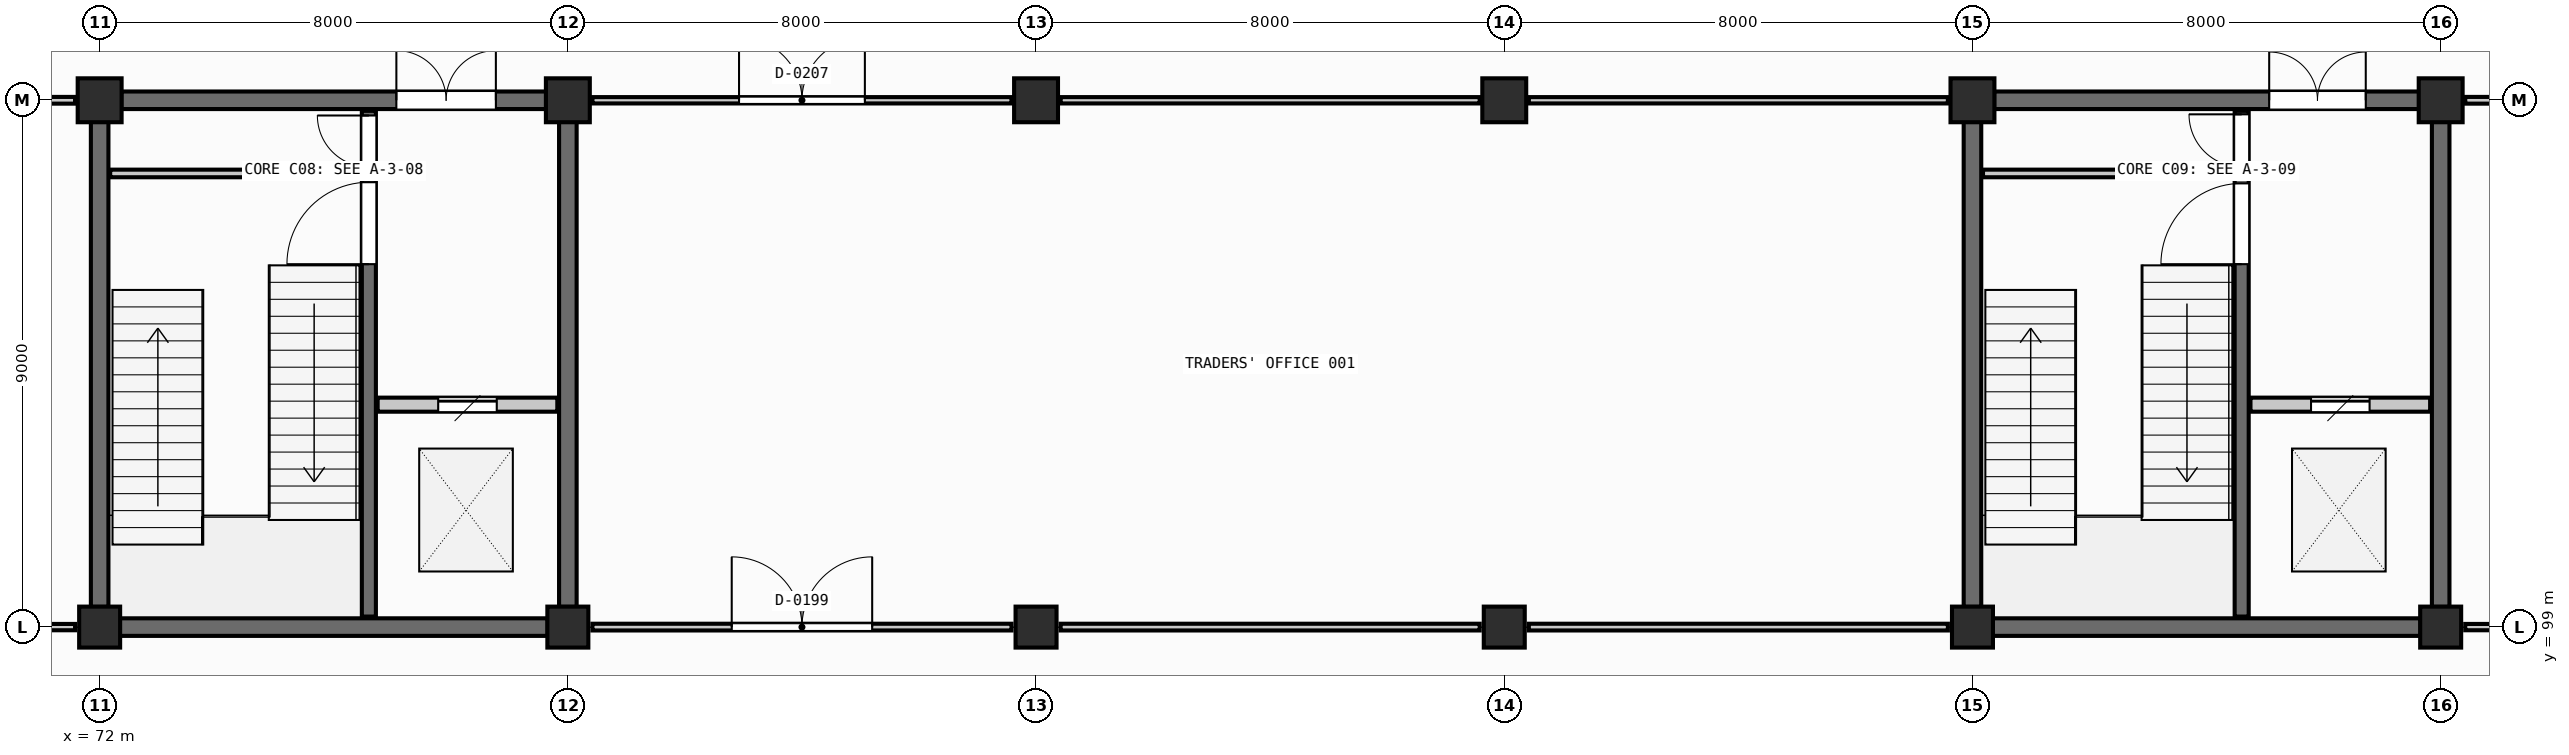
"""IFC4 building model, lengths in metres.
Left out: names, types, materials, properties, quantities, classifications, styles, units other than length and angle.
Written with IfcOpenShell. Run it as: python <this file> out.ifc"""

import sys

from ifc_helpers import new_model, si_unit, direction, frame, frame_2d, origin, origin_2d, place, context, subcontext, project, spatial, rectangle, extrude, element, fill, save


model = new_model("IFC4")
c1 = context("Model", 3, precision=1e-05, world=origin(), true_north=direction((0.0, 1.0)))
c2 = subcontext(c1, "Body", "Model", "MODEL_VIEW")
j1 = project(units=[si_unit("LENGTHUNIT", "METRE"), si_unit("PLANEANGLEUNIT", "RADIAN")], contexts=[c1])
p1 = place(None, origin())
s1 = spatial("IfcSite", under=j1, at=p1, CompositionType="ELEMENT")
p2 = place(p1, origin())
s2 = spatial("IfcBuilding", under=s1, at=p2, CompositionType="ELEMENT")
p3 = place(p2, origin())
s3 = spatial("IfcBuildingStorey", under=s2, at=p3, CompositionType="ELEMENT", Elevation=0.0)
p4 = place(p3, frame((72.0, 99.0, -1.25), z_axis=(0.0, 0.0, 1.0), x_axis=(1.0, 0.0, 0.0)))
e1 = element("IfcColumn", 1, at=p4, inside=s3, PredefinedType="COLUMN", context=c2, shape_type="SweptSolid", body=[
    extrude(rectangle(XDim=0.7, YDim=0.7, at=origin_2d()), origin(), (0.0, 0.0, 1.0), 6.05),
])
p5 = place(p3, frame((72.0, 108.0, -1.25), z_axis=(0.0, 0.0, 1.0), x_axis=(1.0, 0.0, 0.0)))
e2 = element("IfcColumn", 2, at=p5, inside=s3, PredefinedType="COLUMN", context=c2, shape_type="SweptSolid", body=[
    extrude(rectangle(XDim=0.75, YDim=0.75, at=origin_2d()), origin(), (0.0, 0.0, 1.0), 6.05),
])
p6 = place(p3, frame((80.0, 99.0, -1.25), z_axis=(0.0, 0.0, 1.0), x_axis=(1.0, 0.0, 0.0)))
e3 = element("IfcColumn", 3, at=p6, inside=s3, PredefinedType="COLUMN", context=c2, shape_type="SweptSolid", body=[
    extrude(rectangle(XDim=0.7, YDim=0.7, at=origin_2d()), origin(), (0.0, 0.0, 1.0), 6.05),
])
p7 = place(p3, frame((80.0, 108.0, -1.25), z_axis=(0.0, 0.0, 1.0), x_axis=(1.0, 0.0, 0.0)))
e4 = element("IfcColumn", 4, at=p7, inside=s3, PredefinedType="COLUMN", context=c2, shape_type="SweptSolid", body=[
    extrude(rectangle(XDim=0.75, YDim=0.75, at=origin_2d()), origin(), (0.0, 0.0, 1.0), 6.05),
])
p8 = place(p3, frame((88.0, 99.0, -1.25), z_axis=(0.0, 0.0, 1.0), x_axis=(1.0, 0.0, 0.0)))
e5 = element("IfcColumn", 5, at=p8, inside=s3, PredefinedType="COLUMN", context=c2, shape_type="SweptSolid", body=[
    extrude(rectangle(XDim=0.7, YDim=0.7, at=origin_2d()), origin(), (0.0, 0.0, 1.0), 6.05),
])
p9 = place(p3, frame((88.0, 108.0, -1.25), z_axis=(0.0, 0.0, 1.0), x_axis=(1.0, 0.0, 0.0)))
e6 = element("IfcColumn", 6, at=p9, inside=s3, PredefinedType="COLUMN", context=c2, shape_type="SweptSolid", body=[
    extrude(rectangle(XDim=0.75, YDim=0.75, at=origin_2d()), origin(), (0.0, 0.0, 1.0), 6.05),
])
p10 = place(p3, frame((96.0, 99.0, -1.25), z_axis=(0.0, 0.0, 1.0), x_axis=(1.0, 0.0, 0.0)))
e7 = element("IfcColumn", 7, at=p10, inside=s3, PredefinedType="COLUMN", context=c2, shape_type="SweptSolid", body=[
    extrude(rectangle(XDim=0.7, YDim=0.7, at=origin_2d()), origin(), (0.0, 0.0, 1.0), 6.05),
])
p11 = place(p3, frame((96.0, 108.0, -1.25), z_axis=(0.0, 0.0, 1.0), x_axis=(1.0, 0.0, 0.0)))
e8 = element("IfcColumn", 8, at=p11, inside=s3, PredefinedType="COLUMN", context=c2, shape_type="SweptSolid", body=[
    extrude(rectangle(XDim=0.75, YDim=0.75, at=origin_2d()), origin(), (0.0, 0.0, 1.0), 6.05),
])
p12 = place(p3, frame((104.0, 99.0, -1.25), z_axis=(0.0, 0.0, 1.0), x_axis=(1.0, 0.0, 0.0)))
e9 = element("IfcColumn", 9, at=p12, inside=s3, PredefinedType="COLUMN", context=c2, shape_type="SweptSolid", body=[
    extrude(rectangle(XDim=0.7, YDim=0.7, at=origin_2d()), origin(), (0.0, 0.0, 1.0), 6.05),
])
p13 = place(p3, frame((104.0, 108.0, -1.25), z_axis=(0.0, 0.0, 1.0), x_axis=(1.0, 0.0, 0.0)))
e10 = element("IfcColumn", 10, at=p13, inside=s3, PredefinedType="COLUMN", context=c2, shape_type="SweptSolid", body=[
    extrude(rectangle(XDim=0.75, YDim=0.75, at=origin_2d()), origin(), (0.0, 0.0, 1.0), 6.05),
])
p14 = place(p3, frame((112.0, 99.0, -1.25), z_axis=(0.0, 0.0, 1.0), x_axis=(1.0, 0.0, 0.0)))
e11 = element("IfcColumn", 11, at=p14, inside=s3, PredefinedType="COLUMN", context=c2, shape_type="SweptSolid", body=[
    extrude(rectangle(XDim=0.7, YDim=0.7, at=origin_2d()), origin(), (0.0, 0.0, 1.0), 6.05),
])
p15 = place(p3, frame((112.0, 108.0, -1.25), z_axis=(0.0, 0.0, 1.0), x_axis=(1.0, 0.0, 0.0)))
e12 = element("IfcColumn", 12, at=p15, inside=s3, PredefinedType="COLUMN", context=c2, shape_type="SweptSolid", body=[
    extrude(rectangle(XDim=0.75, YDim=0.75, at=origin_2d()), origin(), (0.0, 0.0, 1.0), 6.05),
])
p16 = place(p3, frame((72.345, 99.0, -1.25), z_axis=(0.0, 0.0, 1.0), x_axis=(1.0, 0.0, 0.0)))
e13 = element("IfcWall", 13, at=p16, inside=s3, PredefinedType="SHEAR", context=c2, shape_type="SweptSolid", body=[
    extrude(rectangle(XDim=7.31, YDim=0.3, at=frame_2d((3.655, 0.0))), origin(), (0.0, 0.0, 1.0), 5.805),
])
p17 = place(p3, frame((72.37, 108.0, -1.25), z_axis=(0.0, 0.0, 1.0), x_axis=(1.0, 0.0, 0.0)))
e14 = element("IfcWall", 14, at=p17, inside=s3, PredefinedType="SHEAR", context=c2, shape_type="SweptSolid", body=[
    extrude(rectangle(XDim=7.26, YDim=0.3, at=frame_2d((3.63, 0.0))), origin(), (0.0, 0.0, 1.0), 5.805),
])
p18 = place(p17, frame((4.7, 0.0, 1.25)))
e15 = element("IfcOpeningElement", 15, at=p18, cuts=e14, PredefinedType="OPENING", context=c2, shape_type="SweptSolid", body=[
    extrude(rectangle(XDim=1.7, YDim=2.25, at=frame_2d((0.85, 1.125))), frame((0.0, 0.16, 0.0), z_axis=(0.0, -1.0, 0.0), x_axis=(1.0, 0.0, 0.0)), (0.0, 0.0, 1.0), 0.32),
])
for number, where, z_axis, x_axis in (
    (16, (72.0, 99.345, -1.25), (0.0, 0.0, 1.0), (0.0, 1.0, 0.0)),
    (17, (80.0, 99.345, -1.25), (0.0, 0.0, 1.0), (0.0, 1.0, 0.0)),
):
    element("IfcWall", number, at=place(p3, frame(where, z_axis=z_axis, x_axis=x_axis)), inside=s3, PredefinedType="SHEAR", context=c2, shape_type="SweptSolid", body=[
        extrude(rectangle(XDim=8.285, YDim=0.3, at=frame_2d((4.143, 0.0))), origin(), (0.0, 0.0, 1.0), 5.805),
    ])
p19 = place(p3, frame((76.6, 99.18, -1.25), z_axis=(0.0, 0.0, 1.0), x_axis=(0.0, 1.0, 0.0)))
e18 = element("IfcWall", 18, at=p19, inside=s3, PredefinedType="SHEAR", context=c2, shape_type="SweptSolid", body=[
    extrude(rectangle(XDim=8.64, YDim=0.24, at=frame_2d((4.32, 0.0))), origin(), (0.0, 0.0, 1.0), 5.805),
])
p20 = place(p19, frame((6.02, 0.0, 1.25)))
e19 = element("IfcOpeningElement", 19, at=p20, cuts=e18, PredefinedType="OPENING", context=c2, shape_type="SweptSolid", body=[
    extrude(rectangle(XDim=1.4, YDim=2.2, at=frame_2d((0.7, 1.1))), frame((0.0, 0.13, 0.0), z_axis=(0.0, -1.0, 0.0), x_axis=(1.0, 0.0, 0.0)), (0.0, 0.0, 1.0), 0.26),
])
p21 = place(p19, frame((7.68, 0.0, 1.25)))
e20 = element("IfcOpeningElement", 20, at=p21, cuts=e18, PredefinedType="OPENING", context=c2, shape_type="SweptSolid", body=[
    extrude(rectangle(XDim=0.88, YDim=2.02, at=frame_2d((0.44, 1.01))), frame((0.0, 0.13, 0.0), z_axis=(0.0, -1.0, 0.0), x_axis=(1.0, 0.0, 0.0)), (0.0, 0.0, 1.0), 0.26),
])
p22 = place(p3, frame((72.18, 106.75, 0.0), z_axis=(0.0, 0.0, 1.0), x_axis=(1.0, 0.0, 0.0)))
e21 = element("IfcWall", 21, at=p22, inside=s3, PredefinedType="PARTITIONING", context=c2, shape_type="SweptSolid", body=[
    extrude(rectangle(XDim=4.28, YDim=0.13, at=frame_2d((2.14, 0.0))), origin(), (0.0, 0.0, 1.0), 3.905),
])
p23 = place(p3, frame((76.75, 102.8, 0.0), z_axis=(0.0, 0.0, 1.0), x_axis=(1.0, 0.0, 0.0)))
e22 = element("IfcWall", 22, at=p23, inside=s3, PredefinedType="SHEAR", context=c2, shape_type="SweptSolid", body=[
    extrude(rectangle(XDim=3.07, YDim=0.24, at=frame_2d((1.535, 0.0))), origin(), (0.0, 0.0, 1.0), 3.905),
])
p24 = place(p23, frame((1.035, 0.0, 0.0)))
e23 = element("IfcOpeningElement", 23, at=p24, cuts=e22, PredefinedType="OPENING", context=c2, shape_type="SweptSolid", body=[
    extrude(rectangle(XDim=1.0, YDim=2.15, at=frame_2d((0.5, 1.075))), frame((0.0, 0.13, 0.0), z_axis=(0.0, -1.0, 0.0), x_axis=(1.0, 0.0, 0.0)), (0.0, 0.0, 1.0), 0.26),
])
p25 = place(p3, frame((104.345, 99.0, -1.25), z_axis=(0.0, 0.0, 1.0), x_axis=(1.0, 0.0, 0.0)))
e24 = element("IfcWall", 24, at=p25, inside=s3, PredefinedType="SHEAR", context=c2, shape_type="SweptSolid", body=[
    extrude(rectangle(XDim=7.31, YDim=0.3, at=frame_2d((3.655, 0.0))), origin(), (0.0, 0.0, 1.0), 5.805),
])
p26 = place(p3, frame((104.37, 108.0, -1.25), z_axis=(0.0, 0.0, 1.0), x_axis=(1.0, 0.0, 0.0)))
e25 = element("IfcWall", 25, at=p26, inside=s3, PredefinedType="SHEAR", context=c2, shape_type="SweptSolid", body=[
    extrude(rectangle(XDim=7.26, YDim=0.3, at=frame_2d((3.63, 0.0))), origin(), (0.0, 0.0, 1.0), 5.805),
])
p27 = place(p26, frame((4.7, 0.0, 1.25)))
e26 = element("IfcOpeningElement", 26, at=p27, cuts=e25, PredefinedType="OPENING", context=c2, shape_type="SweptSolid", body=[
    extrude(rectangle(XDim=1.65, YDim=2.22, at=frame_2d((0.825, 1.11))), frame((0.0, 0.16, 0.0), z_axis=(0.0, -1.0, 0.0), x_axis=(1.0, 0.0, 0.0)), (0.0, 0.0, 1.0), 0.32),
])
for number, where, z_axis, x_axis in (
    (27, (104.0, 99.345, -1.25), (0.0, 0.0, 1.0), (0.0, 1.0, 0.0)),
    (28, (112.0, 99.345, -1.25), (0.0, 0.0, 1.0), (0.0, 1.0, 0.0)),
):
    element("IfcWall", number, at=place(p3, frame(where, z_axis=z_axis, x_axis=x_axis)), inside=s3, PredefinedType="SHEAR", context=c2, shape_type="SweptSolid", body=[
        extrude(rectangle(XDim=8.285, YDim=0.3, at=frame_2d((4.143, 0.0))), origin(), (0.0, 0.0, 1.0), 5.805),
    ])
p28 = place(p3, frame((108.6, 99.18, -1.25), z_axis=(0.0, 0.0, 1.0), x_axis=(0.0, 1.0, 0.0)))
e29 = element("IfcWall", 29, at=p28, inside=s3, PredefinedType="SHEAR", context=c2, shape_type="SweptSolid", body=[
    extrude(rectangle(XDim=8.64, YDim=0.24, at=frame_2d((4.32, 0.0))), origin(), (0.0, 0.0, 1.0), 5.805),
])
p29 = place(p28, frame((6.02, 0.0, 1.25)))
e30 = element("IfcOpeningElement", 30, at=p29, cuts=e29, PredefinedType="OPENING", context=c2, shape_type="SweptSolid", body=[
    extrude(rectangle(XDim=1.38, YDim=2.22, at=frame_2d((0.69, 1.11))), frame((0.0, 0.13, 0.0), z_axis=(0.0, -1.0, 0.0), x_axis=(1.0, 0.0, 0.0)), (0.0, 0.0, 1.0), 0.26),
])
p30 = place(p28, frame((7.68, 0.0, 1.25)))
e31 = element("IfcOpeningElement", 31, at=p30, cuts=e29, PredefinedType="OPENING", context=c2, shape_type="SweptSolid", body=[
    extrude(rectangle(XDim=0.9, YDim=2.05, at=frame_2d((0.45, 1.025))), frame((0.0, 0.13, 0.0), z_axis=(0.0, -1.0, 0.0), x_axis=(1.0, 0.0, 0.0)), (0.0, 0.0, 1.0), 0.26),
])
p31 = place(p3, frame((104.18, 106.75, 0.0), z_axis=(0.0, 0.0, 1.0), x_axis=(1.0, 0.0, 0.0)))
e32 = element("IfcWall", 32, at=p31, inside=s3, PredefinedType="PARTITIONING", context=c2, shape_type="SweptSolid", body=[
    extrude(rectangle(XDim=4.28, YDim=0.13, at=frame_2d((2.14, 0.0))), origin(), (0.0, 0.0, 1.0), 3.905),
])
p32 = place(p3, frame((108.75, 102.8, 0.0), z_axis=(0.0, 0.0, 1.0), x_axis=(1.0, 0.0, 0.0)))
e33 = element("IfcWall", 33, at=p32, inside=s3, PredefinedType="SHEAR", context=c2, shape_type="SweptSolid", body=[
    extrude(rectangle(XDim=3.07, YDim=0.24, at=frame_2d((1.535, 0.0))), origin(), (0.0, 0.0, 1.0), 3.905),
])
p33 = place(p32, frame((1.035, 0.0, 0.0)))
e34 = element("IfcOpeningElement", 34, at=p33, cuts=e33, PredefinedType="OPENING", context=c2, shape_type="SweptSolid", body=[
    extrude(rectangle(XDim=1.0, YDim=2.15, at=frame_2d((0.5, 1.075))), frame((0.0, 0.13, 0.0), z_axis=(0.0, -1.0, 0.0), x_axis=(1.0, 0.0, 0.0)), (0.0, 0.0, 1.0), 0.26),
])
p34 = place(p3, frame((64.82, 99.0, 0.0), z_axis=(0.0, 0.0, 1.0), x_axis=(1.0, 0.0, 0.0)))
e35 = element("IfcWall", 35, at=p34, inside=s3, PredefinedType="PARTITIONING", context=c2, shape_type="SweptSolid", body=[
    extrude(rectangle(XDim=6.76, YDim=0.108, at=frame_2d((3.38, 0.0))), origin(), (0.0, 0.0, 1.0), 3.65),
])
p35 = place(p34, frame((2.255, 0.0, 0.0)))
e36 = element("IfcOpeningElement", 36, at=p35, cuts=e35, PredefinedType="OPENING", context=c2, shape_type="SweptSolid", body=[
    extrude(rectangle(XDim=2.25, YDim=2.38, at=frame_2d((1.125, 1.19))), frame((0.0, 0.064, 0.0), z_axis=(0.0, -1.0, 0.0), x_axis=(1.0, 0.0, 0.0)), (0.0, 0.0, 1.0), 0.128),
])
p36 = place(p3, frame((80.42, 99.0, 0.0), z_axis=(0.0, 0.0, 1.0), x_axis=(1.0, 0.0, 0.0)))
e37 = element("IfcWall", 37, at=p36, inside=s3, PredefinedType="PARTITIONING", context=c2, shape_type="SweptSolid", body=[
    extrude(rectangle(XDim=7.16, YDim=0.115, at=frame_2d((3.58, 0.0))), origin(), (0.0, 0.0, 1.0), 3.65),
])
p37 = place(p36, frame((2.38, 0.0, 0.0)))
e38 = element("IfcOpeningElement", 38, at=p37, cuts=e37, PredefinedType="OPENING", context=c2, shape_type="SweptSolid", body=[
    extrude(rectangle(XDim=2.4, YDim=2.4, at=frame_2d((1.2, 1.2))), frame((0.0, 0.067, 0.0), z_axis=(0.0, -1.0, 0.0), x_axis=(1.0, 0.0, 0.0)), (0.0, 0.0, 1.0), 0.135),
])
for number, where, z_axis, x_axis in (
    (39, (88.42, 99.0, 0.0), (0.0, 0.0, 1.0), (1.0, 0.0, 0.0)),
    (40, (96.42, 99.0, 0.0), (0.0, 0.0, 1.0), (1.0, 0.0, 0.0)),
):
    element("IfcWall", number, at=place(p3, frame(where, z_axis=z_axis, x_axis=x_axis)), inside=s3, PredefinedType="PARTITIONING", context=c2, shape_type="SweptSolid", body=[
        extrude(rectangle(XDim=7.16, YDim=0.115, at=frame_2d((3.58, 0.0))), origin(), (0.0, 0.0, 1.0), 3.65),
    ])
p38 = place(p3, frame((112.42, 99.0, 0.0), z_axis=(0.0, 0.0, 1.0), x_axis=(1.0, 0.0, 0.0)))
e41 = element("IfcWall", 41, at=p38, inside=s3, PredefinedType="PARTITIONING", context=c2, shape_type="SweptSolid", body=[
    extrude(rectangle(XDim=7.16, YDim=0.108, at=frame_2d((3.58, 0.0))), origin(), (0.0, 0.0, 1.0), 3.65),
])
p39 = place(p38, frame((2.505, 0.0, 0.0)))
e42 = element("IfcOpeningElement", 42, at=p39, cuts=e41, PredefinedType="OPENING", context=c2, shape_type="SweptSolid", body=[
    extrude(rectangle(XDim=2.15, YDim=2.35, at=frame_2d((1.075, 1.175))), frame((0.0, 0.064, 0.0), z_axis=(0.0, -1.0, 0.0), x_axis=(1.0, 0.0, 0.0)), (0.0, 0.0, 1.0), 0.128),
])
p40 = place(p3, frame((64.82, 108.0, 0.0), z_axis=(0.0, 0.0, 1.0), x_axis=(1.0, 0.0, 0.0)))
e43 = element("IfcWall", 43, at=p40, inside=s3, PredefinedType="PARTITIONING", context=c2, shape_type="SweptSolid", body=[
    extrude(rectangle(XDim=6.76, YDim=0.115, at=frame_2d((3.38, 0.0))), origin(), (0.0, 0.0, 1.0), 3.65),
])
p41 = place(p40, frame((2.18, 0.0, 0.0)))
e44 = element("IfcOpeningElement", 44, at=p41, cuts=e43, PredefinedType="OPENING", context=c2, shape_type="SweptSolid", body=[
    extrude(rectangle(XDim=2.4, YDim=2.4, at=frame_2d((1.2, 1.2))), frame((0.0, 0.067, 0.0), z_axis=(0.0, -1.0, 0.0), x_axis=(1.0, 0.0, 0.0)), (0.0, 0.0, 1.0), 0.135),
])
p42 = place(p3, frame((80.42, 108.0, 0.0), z_axis=(0.0, 0.0, 1.0), x_axis=(1.0, 0.0, 0.0)))
e45 = element("IfcWall", 45, at=p42, inside=s3, PredefinedType="PARTITIONING", context=c2, shape_type="SweptSolid", body=[
    extrude(rectangle(XDim=7.16, YDim=0.108, at=frame_2d((3.58, 0.0))), origin(), (0.0, 0.0, 1.0), 3.65),
])
p43 = place(p42, frame((2.505, 0.0, 0.0)))
e46 = element("IfcOpeningElement", 46, at=p43, cuts=e45, PredefinedType="OPENING", context=c2, shape_type="SweptSolid", body=[
    extrude(rectangle(XDim=2.15, YDim=2.35, at=frame_2d((1.075, 1.175))), frame((0.0, 0.064, 0.0), z_axis=(0.0, -1.0, 0.0), x_axis=(1.0, 0.0, 0.0)), (0.0, 0.0, 1.0), 0.128),
])
for number, where, z_axis, x_axis in (
    (47, (88.42, 108.0, 0.0), (0.0, 0.0, 1.0), (1.0, 0.0, 0.0)),
    (48, (96.42, 108.0, 0.0), (0.0, 0.0, 1.0), (1.0, 0.0, 0.0)),
):
    element("IfcWall", number, at=place(p3, frame(where, z_axis=z_axis, x_axis=x_axis)), inside=s3, PredefinedType="PARTITIONING", context=c2, shape_type="SweptSolid", body=[
        extrude(rectangle(XDim=7.16, YDim=0.108, at=frame_2d((3.58, 0.0))), origin(), (0.0, 0.0, 1.0), 3.65),
    ])
p44 = place(p3, frame((112.42, 108.0, 0.0), z_axis=(0.0, 0.0, 1.0), x_axis=(1.0, 0.0, 0.0)))
e49 = element("IfcWall", 49, at=p44, inside=s3, PredefinedType="PARTITIONING", context=c2, shape_type="SweptSolid", body=[
    extrude(rectangle(XDim=7.16, YDim=0.115, at=frame_2d((3.58, 0.0))), origin(), (0.0, 0.0, 1.0), 3.65),
])
p45 = place(p44, frame((2.605, 0.0, 0.0)))
e50 = element("IfcOpeningElement", 50, at=p45, cuts=e49, PredefinedType="OPENING", context=c2, shape_type="SweptSolid", body=[
    extrude(rectangle(XDim=1.95, YDim=2.3, at=frame_2d((0.975, 1.15))), frame((0.0, 0.067, 0.0), z_axis=(0.0, -1.0, 0.0), x_axis=(1.0, 0.0, 0.0)), (0.0, 0.0, 1.0), 0.135),
])
p46 = place(p20, origin())
e51 = element("IfcDoor", 51, at=p46, inside=s3, OperationType="SINGLE_SWING_LEFT", PredefinedType="DOOR", context=c2, shape_type="SweptSolid", body=[
    extrude(rectangle(XDim=1.4, YDim=2.2, at=frame_2d((0.7, 1.1))), frame((0.0, 0.025, 0.0), z_axis=(0.0, -1.0, 0.0), x_axis=(1.0, 0.0, 0.0)), (0.0, 0.0, 1.0), 0.05),
])
fill(e19, e51)
p47 = place(p21, origin())
e52 = element("IfcDoor", 52, at=p47, inside=s3, OperationType="SINGLE_SWING_RIGHT", PredefinedType="DOOR", context=c2, shape_type="SweptSolid", body=[
    extrude(rectangle(XDim=0.88, YDim=2.02, at=frame_2d((0.44, 1.01))), frame((0.0, 0.025, 0.0), z_axis=(0.0, -1.0, 0.0), x_axis=(1.0, 0.0, 0.0)), (0.0, 0.0, 1.0), 0.05),
])
fill(e20, e52)
p48 = place(p18, origin())
e53 = element("IfcDoor", 53, at=p48, inside=s3, OperationType="DOUBLE_DOOR_SINGLE_SWING", PredefinedType="DOOR", context=c2, shape_type="SweptSolid", body=[
    extrude(rectangle(XDim=1.7, YDim=2.25, at=frame_2d((0.85, 1.125))), frame((0.0, 0.025, 0.0), z_axis=(0.0, -1.0, 0.0), x_axis=(1.0, 0.0, 0.0)), (0.0, 0.0, 1.0), 0.05),
])
fill(e15, e53)
p49 = place(p24, origin())
e54 = element("IfcDoor", 54, at=p49, inside=s3, OperationType="SLIDING_TO_LEFT", PredefinedType="DOOR", context=c2, shape_type="SweptSolid", body=[
    extrude(rectangle(XDim=1.0, YDim=2.15, at=frame_2d((0.5, 1.075))), frame((0.0, 0.025, 0.0), z_axis=(0.0, -1.0, 0.0), x_axis=(1.0, 0.0, 0.0)), (0.0, 0.0, 1.0), 0.05),
])
fill(e23, e54)
p50 = place(p29, origin())
e55 = element("IfcDoor", 55, at=p50, inside=s3, OperationType="SINGLE_SWING_LEFT", PredefinedType="DOOR", context=c2, shape_type="SweptSolid", body=[
    extrude(rectangle(XDim=1.38, YDim=2.22, at=frame_2d((0.69, 1.11))), frame((0.0, 0.025, 0.0), z_axis=(0.0, -1.0, 0.0), x_axis=(1.0, 0.0, 0.0)), (0.0, 0.0, 1.0), 0.05),
])
fill(e30, e55)
p51 = place(p30, origin())
e56 = element("IfcDoor", 56, at=p51, inside=s3, OperationType="SINGLE_SWING_RIGHT", PredefinedType="DOOR", context=c2, shape_type="SweptSolid", body=[
    extrude(rectangle(XDim=0.9, YDim=2.05, at=frame_2d((0.45, 1.025))), frame((0.0, 0.025, 0.0), z_axis=(0.0, -1.0, 0.0), x_axis=(1.0, 0.0, 0.0)), (0.0, 0.0, 1.0), 0.05),
])
fill(e31, e56)
p52 = place(p27, origin())
e57 = element("IfcDoor", 57, at=p52, inside=s3, OperationType="DOUBLE_DOOR_SINGLE_SWING", PredefinedType="DOOR", context=c2, shape_type="SweptSolid", body=[
    extrude(rectangle(XDim=1.65, YDim=2.22, at=frame_2d((0.825, 1.11))), frame((0.0, 0.025, 0.0), z_axis=(0.0, -1.0, 0.0), x_axis=(1.0, 0.0, 0.0)), (0.0, 0.0, 1.0), 0.05),
])
fill(e26, e57)
p53 = place(p33, origin())
e58 = element("IfcDoor", 58, at=p53, inside=s3, OperationType="SLIDING_TO_LEFT", PredefinedType="DOOR", context=c2, shape_type="SweptSolid", body=[
    extrude(rectangle(XDim=1.0, YDim=2.15, at=frame_2d((0.5, 1.075))), frame((0.0, 0.025, 0.0), z_axis=(0.0, -1.0, 0.0), x_axis=(1.0, 0.0, 0.0)), (0.0, 0.0, 1.0), 0.05),
])
fill(e34, e58)
p54 = place(p37, origin())
e59 = element("IfcDoor", 59, at=p54, inside=s3, OperationType="DOUBLE_DOOR_SINGLE_SWING", PredefinedType="DOOR", context=c2, shape_type="SweptSolid", body=[
    extrude(rectangle(XDim=2.4, YDim=2.4, at=frame_2d((1.2, 1.2))), frame((0.0, 0.025, 0.0), z_axis=(0.0, -1.0, 0.0), x_axis=(1.0, 0.0, 0.0)), (0.0, 0.0, 1.0), 0.05),
])
fill(e38, e59)
p55 = place(p43, origin())
e60 = element("IfcDoor", 60, at=p55, inside=s3, OperationType="DOUBLE_DOOR_SINGLE_SWING", PredefinedType="DOOR", context=c2, shape_type="SweptSolid", body=[
    extrude(rectangle(XDim=2.15, YDim=2.35, at=frame_2d((1.075, 1.175))), frame((0.0, 0.025, 0.0), z_axis=(0.0, -1.0, 0.0), x_axis=(1.0, 0.0, 0.0)), (0.0, 0.0, 1.0), 0.05),
])
fill(e46, e60)
save(model, sys.argv[1])
